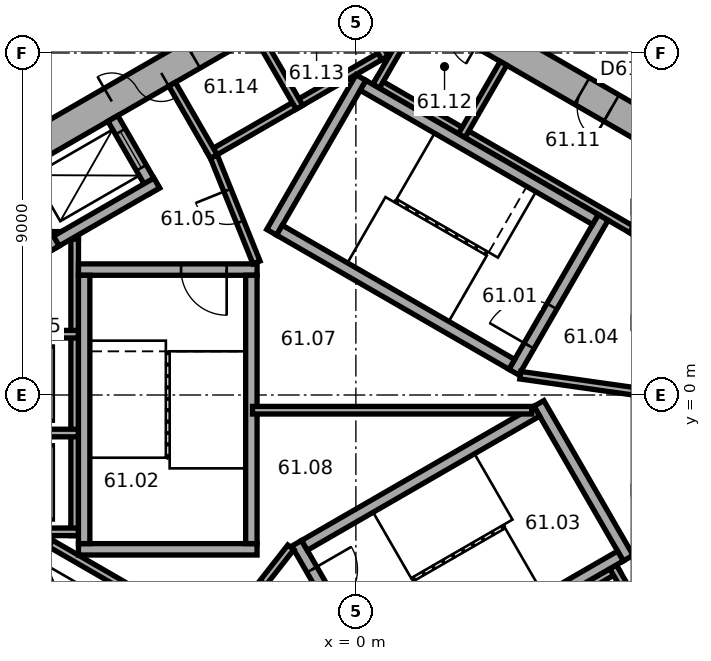
"""IFC4 building model, lengths in metres.
Left out: names, types, materials, properties, quantities, classifications, styles, units other than length and angle.
Written with IfcOpenShell. Run it as: python <this file> out.ifc"""

import sys

from ifc_helpers import new_model, si_unit, direction, frame, frame_2d, origin, place, context, subcontext, project, spatial, rectangle, extrude, element, fill, save


model = new_model("IFC4")
c1 = context("Model", 3, precision=1e-05, world=origin(), true_north=direction((0.0, 1.0)))
c2 = subcontext(c1, "Body", "Model", "MODEL_VIEW")
j1 = project(units=[si_unit("LENGTHUNIT", "METRE"), si_unit("PLANEANGLEUNIT", "RADIAN")], contexts=[c1])
p1 = place(None, origin())
s1 = spatial("IfcSite", under=j1, at=p1, CompositionType="ELEMENT")
p2 = place(p1, origin())
s2 = spatial("IfcBuilding", under=s1, at=p2, CompositionType="ELEMENT")
p3 = place(p2, frame((0.0, 0.0, 247.6)))
s3 = spatial("IfcBuildingStorey", under=s2, at=p3, CompositionType="ELEMENT", Elevation=247.6)
p4 = place(p3, frame((10.1, 5.6, 0.0), z_axis=(0.0, 0.0, 1.0), x_axis=(-0.866023897231, 0.500002609418, 0.0)))
e1 = element("IfcWall", 1, at=p4, inside=s3, PredefinedType="SHEAR", context=c2, shape_type="SweptSolid", body=[
    extrude(rectangle(XDim=11.894, YDim=0.8, at=frame_2d((5.947, 0.0))), origin(), (0.0, 0.0, 1.0), 3.7),
])
p5 = place(p4, frame((3.897, 0.0, 0.0)))
e2 = element("IfcOpeningElement", 2, at=p5, cuts=e1, PredefinedType="OPENING", context=c2, shape_type="SweptSolid", body=[
    extrude(rectangle(XDim=0.9, YDim=2.1, at=frame_2d((0.45, 1.05))), frame((0.0, 0.41, 0.0), z_axis=(0.0, -1.0, 0.0), x_axis=(1.0, 0.0, 0.0)), (0.0, 0.0, 1.0), 0.82),
])
p6 = place(p4, frame((7.797, 0.0, 0.0)))
e3 = element("IfcOpeningElement", 3, at=p6, cuts=e1, PredefinedType="OPENING", context=c2, shape_type="SweptSolid", body=[
    extrude(rectangle(XDim=0.9, YDim=2.1, at=frame_2d((0.45, 1.05))), frame((0.0, 0.41, 0.0), z_axis=(0.0, -1.0, 0.0), x_axis=(1.0, 0.0, 0.0)), (0.0, 0.0, 1.0), 0.82),
])
p7 = place(p3, frame((0.2, 11.547, 0.0), z_axis=(0.0, 0.0, 1.0), x_axis=(-0.866023897231, -0.500002609418, 0.0)))
e4 = element("IfcWall", 4, at=p7, inside=s3, PredefinedType="SHEAR", context=c2, shape_type="SweptSolid", body=[
    extrude(rectangle(XDim=11.894, YDim=0.8, at=frame_2d((5.947, 0.0))), origin(), (0.0, 0.0, 1.0), 3.7),
])
p8 = place(p7, frame((6.147, 0.0, 0.0)))
e5 = element("IfcOpeningElement", 5, at=p8, cuts=e4, PredefinedType="OPENING", context=c2, shape_type="SweptSolid", body=[
    extrude(rectangle(XDim=1.5, YDim=2.1, at=frame_2d((0.75, 1.05))), frame((0.0, 0.41, 0.0), z_axis=(0.0, -1.0, 0.0), x_axis=(1.0, 0.0, 0.0)), (0.0, 0.0, 1.0), 0.82),
])
p9 = place(p7, frame((1.697, 0.0, 0.0)))
e6 = element("IfcOpeningElement", 6, at=p9, cuts=e4, PredefinedType="OPENING", context=c2, shape_type="SweptSolid", body=[
    extrude(rectangle(XDim=0.9, YDim=2.1, at=frame_2d((0.45, 1.05))), frame((0.0, 0.41, 0.0), z_axis=(0.0, -1.0, 0.0), x_axis=(1.0, 0.0, 0.0)), (0.0, 0.0, 1.0), 0.82),
])
p10 = place(p7, frame((4.297, 0.0, 0.0)))
e7 = element("IfcOpeningElement", 7, at=p10, cuts=e4, PredefinedType="OPENING", context=c2, shape_type="SweptSolid", body=[
    extrude(rectangle(XDim=0.9, YDim=2.1, at=frame_2d((0.45, 1.05))), frame((0.0, 0.41, 0.0), z_axis=(0.0, -1.0, 0.0), x_axis=(1.0, 0.0, 0.0)), (0.0, 0.0, 1.0), 0.82),
])
p11 = place(p3, frame((7.424, 4.259, 0.0), z_axis=(0.0, 0.0, 1.0), x_axis=(-0.866026010844, 0.49999894854, 0.0)))
e8 = element("IfcWall", 8, at=p11, inside=s3, PredefinedType="PARTITIONING", context=c2, shape_type="SweptSolid", body=[
    extrude(rectangle(XDim=8.0, YDim=0.2, at=frame_2d((4.0, 0.0))), origin(), (0.0, 0.0, 1.0), 3.42),
])
for number, where, z_axis, x_axis in (
    (9, (7.287, 4.222, 0.0), (0.0, 0.0, 1.0), (0.5, 0.866, 0.0)),
    (10, (2.784, 6.822, 0.0), (0.0, 0.0, 1.0), (0.5, 0.866, 0.0)),
    (11, (0.532, 8.122, 0.0), (0.0, 0.0, 1.0), (0.5, 0.866, 0.0)),
):
    element("IfcWall", number, at=place(p3, frame(where, z_axis=z_axis, x_axis=x_axis)), inside=s3, PredefinedType="PARTITIONING", context=c2, shape_type="SweptSolid", body=[
        extrude(rectangle(XDim=2.2, YDim=0.2, at=frame_2d((1.1, 0.0))), origin(), (0.0, 0.0, 1.0), 3.42),
    ])
p12 = place(p3, frame((0.803, 9.009, 0.0), z_axis=(0.0, 0.0, 1.0), x_axis=(-0.866028230842, -0.499995103361, 0.0)))
e12 = element("IfcWall", 12, at=p12, inside=s3, PredefinedType="PARTITIONING", context=c2, shape_type="SweptSolid", body=[
    extrude(rectangle(XDim=5.4, YDim=0.2, at=frame_2d((2.7, 0.0))), origin(), (0.0, 0.0, 1.0), 3.42),
])
p13 = place(p3, frame((0.767, 8.872, 0.0), z_axis=(0.0, 0.0, 1.0), x_axis=(-0.499994660107, 0.866028486751, 0.0)))
e13 = element("IfcWall", 13, at=p13, inside=s3, PredefinedType="PARTITIONING", context=c2, shape_type="SweptSolid", body=[
    extrude(rectangle(XDim=2.2, YDim=0.2, at=frame_2d((1.1, 0.0))), origin(), (0.0, 0.0, 1.0), 3.42),
])
for number, where, z_axis, x_axis in (
    (14, (-1.485, 7.572, 0.0), (0.0, 0.0, 1.0), (-0.5, 0.866, 0.0)),
    (15, (-3.737, 6.272, 0.0), (0.0, 0.0, 1.0), (-0.5, 0.866, 0.0)),
):
    element("IfcWall", number, at=place(p3, frame(where, z_axis=z_axis, x_axis=x_axis)), inside=s3, PredefinedType="PARTITIONING", context=c2, shape_type="SweptSolid", body=[
        extrude(rectangle(XDim=2.2, YDim=0.2, at=frame_2d((1.1, 0.0))), origin(), (0.0, 0.0, 1.0), 3.42),
    ])
p14 = place(p3, frame((-7.4, 4.3, 0.0), z_axis=(0.0, 0.0, 1.0), x_axis=(0.0, -1.0, 0.0)))
e16 = element("IfcWall", 16, at=p14, inside=s3, PredefinedType="PARTITIONING", context=c2, shape_type="SweptSolid", body=[
    extrude(rectangle(XDim=8.0, YDim=0.2, at=frame_2d((4.0, 0.0))), origin(), (0.0, 0.0, 1.0), 3.42),
])
for number, where, z_axis, x_axis in (
    (17, (-7.3, 4.2, 0.0), (0.0, 0.0, 1.0), (-1.0, 0.0, 0.0)),
    (18, (-7.3, 1.6, 0.0), (0.0, 0.0, 1.0), (-1.0, 0.0, 0.0)),
    (19, (-7.3, -1.0, 0.0), (0.0, 0.0, 1.0), (-1.0, 0.0, 0.0)),
    (20, (-7.3, -3.6, 0.0), (0.0, 0.0, 1.0), (-1.0, 0.0, 0.0)),
):
    element("IfcWall", number, at=place(p3, frame(where, z_axis=z_axis, x_axis=x_axis)), inside=s3, PredefinedType="PARTITIONING", context=c2, shape_type="SweptSolid", body=[
        extrude(rectangle(XDim=2.2, YDim=0.2, at=frame_2d((1.1, 0.0))), origin(), (0.0, 0.0, 1.0), 3.42),
    ])
p15 = place(p3, frame((-8.203, -3.809, 0.0), z_axis=(0.0, 0.0, 1.0), x_axis=(0.866028230842, -0.499995103361, 0.0)))
e21 = element("IfcWall", 21, at=p15, inside=s3, PredefinedType="PARTITIONING", context=c2, shape_type="SweptSolid", body=[
    extrude(rectangle(XDim=5.4, YDim=0.2, at=frame_2d((2.7, 0.0))), origin(), (0.0, 0.0, 1.0), 3.42),
])
p16 = place(p3, frame((-8.067, -3.772, 0.0), z_axis=(0.0, 0.0, 1.0), x_axis=(-0.50002983664, -0.866008176907, 0.0)))
e22 = element("IfcWall", 22, at=p16, inside=s3, PredefinedType="PARTITIONING", context=c2, shape_type="SweptSolid", body=[
    extrude(rectangle(XDim=2.2, YDim=0.2, at=frame_2d((1.1, 0.0))), origin(), (0.0, 0.0, 1.0), 3.42),
])
p17 = place(p3, frame((-0.024, -8.559, 0.0), z_axis=(0.0, 0.0, 1.0), x_axis=(0.866026010844, 0.49999894854, 0.0)))
e23 = element("IfcWall", 23, at=p17, inside=s3, PredefinedType="PARTITIONING", context=c2, shape_type="SweptSolid", body=[
    extrude(rectangle(XDim=8.0, YDim=0.2, at=frame_2d((4.0, 0.0))), origin(), (0.0, 0.0, 1.0), 3.42),
])
p18 = place(p3, frame((6.768, -4.522, 0.0), z_axis=(0.0, 0.0, 1.0), x_axis=(0.50002983664, -0.866008176907, 0.0)))
e24 = element("IfcWall", 24, at=p18, inside=s3, PredefinedType="PARTITIONING", context=c2, shape_type="SweptSolid", body=[
    extrude(rectangle(XDim=2.2, YDim=0.2, at=frame_2d((1.1, 0.0))), origin(), (0.0, 0.0, 1.0), 3.42),
])
p19 = place(p3, frame((4.158, 0.602, 0.0), z_axis=(0.0, 0.0, 1.0), x_axis=(0.499977259774, 0.866038532462, 0.0)))
e25 = element("IfcWall", 25, at=p19, inside=s3, PredefinedType="SHEAR", context=c2, shape_type="SweptSolid", body=[
    extrude(rectangle(XDim=4.7, YDim=0.3, at=frame_2d((2.35, 0.0))), origin(), (0.0, 0.0, 1.0), 3.42),
])
p20 = place(p19, frame((0.8, 0.0, 0.0)))
e26 = element("IfcOpeningElement", 26, at=p20, cuts=e25, PredefinedType="OPENING", context=c2, shape_type="SweptSolid", body=[
    extrude(rectangle(XDim=1.2, YDim=2.1, at=frame_2d((0.6, 1.05))), frame((0.0, 0.16, 0.0), z_axis=(0.0, -1.0, 0.0), x_axis=(1.0, 0.0, 0.0)), (0.0, 0.0, 1.0), 0.32),
])
p21 = place(p3, frame((-2.216, 4.282, 0.0), z_axis=(0.0, 0.0, 1.0), x_axis=(0.499977259774, 0.866038532462, 0.0)))
e27 = element("IfcWall", 27, at=p21, inside=s3, PredefinedType="SHEAR", context=c2, shape_type="SweptSolid", body=[
    extrude(rectangle(XDim=4.7, YDim=0.3, at=frame_2d((2.35, 0.0))), origin(), (0.0, 0.0, 1.0), 3.42),
])
for number, where, z_axis, x_axis in (
    (28, (4.103, 0.807, 0.0), (0.0, 0.0, 1.0), (-0.866, 0.5, 0.0)),
    (29, (6.303, 4.617, 0.0), (0.0, 0.0, 1.0), (-0.866, 0.5, 0.0)),
):
    element("IfcWall", number, at=place(p3, frame(where, z_axis=z_axis, x_axis=x_axis)), inside=s3, PredefinedType="SHEAR", context=c2, shape_type="SweptSolid", body=[
        extrude(rectangle(XDim=7.06, YDim=0.3, at=frame_2d((3.53, 0.0))), origin(), (0.0, 0.0, 1.0), 3.42),
    ])
p22 = place(p3, frame((-2.6, 3.3, 0.0), z_axis=(0.0, 0.0, 1.0), x_axis=(-1.0, 0.0, 0.0)))
e30 = element("IfcWall", 30, at=p22, inside=s3, PredefinedType="SHEAR", context=c2, shape_type="SweptSolid", body=[
    extrude(rectangle(XDim=4.7, YDim=0.3, at=frame_2d((2.35, 0.0))), origin(), (0.0, 0.0, 1.0), 3.42),
])
p23 = place(p22, frame((0.8, 0.0, 0.0)))
e31 = element("IfcOpeningElement", 31, at=p23, cuts=e30, PredefinedType="OPENING", context=c2, shape_type="SweptSolid", body=[
    extrude(rectangle(XDim=1.2, YDim=2.1, at=frame_2d((0.6, 1.05))), frame((0.0, 0.16, 0.0), z_axis=(0.0, -1.0, 0.0), x_axis=(1.0, 0.0, 0.0)), (0.0, 0.0, 1.0), 0.32),
])
p24 = place(p3, frame((-2.6, -4.06, 0.0), z_axis=(0.0, 0.0, 1.0), x_axis=(-1.0, 0.0, 0.0)))
e32 = element("IfcWall", 32, at=p24, inside=s3, PredefinedType="SHEAR", context=c2, shape_type="SweptSolid", body=[
    extrude(rectangle(XDim=4.7, YDim=0.3, at=frame_2d((2.35, 0.0))), origin(), (0.0, 0.0, 1.0), 3.42),
])
for number, where, z_axis, x_axis in (
    (33, (-2.75, 3.15, 0.0), (0.0, 0.0, 1.0), (0.0, -1.0, 0.0)),
    (34, (-7.15, 3.15, 0.0), (0.0, 0.0, 1.0), (0.0, -1.0, 0.0)),
):
    element("IfcWall", number, at=place(p3, frame(where, z_axis=z_axis, x_axis=x_axis)), inside=s3, PredefinedType="SHEAR", context=c2, shape_type="SweptSolid", body=[
        extrude(rectangle(XDim=7.06, YDim=0.3, at=frame_2d((3.53, 0.0))), origin(), (0.0, 0.0, 1.0), 3.42),
    ])
p25 = place(p3, frame((-1.558, -3.902, 0.0), z_axis=(0.0, 0.0, 1.0), x_axis=(0.499977259774, -0.866038532462, 0.0)))
e35 = element("IfcWall", 35, at=p25, inside=s3, PredefinedType="SHEAR", context=c2, shape_type="SweptSolid", body=[
    extrude(rectangle(XDim=4.7, YDim=0.3, at=frame_2d((2.35, 0.0))), origin(), (0.0, 0.0, 1.0), 3.42),
])
p26 = place(p25, frame((0.8, 0.0, 0.0)))
e36 = element("IfcOpeningElement", 36, at=p26, cuts=e35, PredefinedType="OPENING", context=c2, shape_type="SweptSolid", body=[
    extrude(rectangle(XDim=1.2, YDim=2.1, at=frame_2d((0.6, 1.05))), frame((0.0, 0.16, 0.0), z_axis=(0.0, -1.0, 0.0), x_axis=(1.0, 0.0, 0.0)), (0.0, 0.0, 1.0), 0.32),
])
p27 = place(p3, frame((4.816, -0.222, 0.0), z_axis=(0.0, 0.0, 1.0), x_axis=(0.499977259774, -0.866038532462, 0.0)))
e37 = element("IfcWall", 37, at=p27, inside=s3, PredefinedType="SHEAR", context=c2, shape_type="SweptSolid", body=[
    extrude(rectangle(XDim=4.7, YDim=0.3, at=frame_2d((2.35, 0.0))), origin(), (0.0, 0.0, 1.0), 3.42),
])
for number, where, z_axis, x_axis in (
    (38, (-1.353, -3.957, 0.0), (0.0, 0.0, 1.0), (0.866, 0.5, 0.0)),
    (39, (0.847, -7.767, 0.0), (0.0, 0.0, 1.0), (0.866, 0.5, 0.0)),
):
    element("IfcWall", number, at=place(p3, frame(where, z_axis=z_axis, x_axis=x_axis)), inside=s3, PredefinedType="SHEAR", context=c2, shape_type="SweptSolid", body=[
        extrude(rectangle(XDim=7.06, YDim=0.3, at=frame_2d((3.53, 0.0))), origin(), (0.0, 0.0, 1.0), 3.42),
    ])
p28 = place(p3, frame((4.327, 0.521, 0.0), z_axis=(0.0, 0.0, 1.0), x_axis=(0.990124376366, -0.14019172346, 0.0)))
e40 = element("IfcWall", 40, at=p28, inside=s3, PredefinedType="PARTITIONING", context=c2, shape_type="SweptSolid", body=[
    extrude(rectangle(XDim=3.002, YDim=0.2, at=frame_2d((1.501, 0.0))), origin(), (0.0, 0.0, 1.0), 3.42),
])
p29 = place(p3, frame((-5.295, 5.372, 0.0), z_axis=(0.0, 0.0, 1.0), x_axis=(-0.500077893725, 0.86598042715, 0.0)))
e41 = element("IfcWall", 41, at=p29, inside=s3, PredefinedType="SHEAR", context=c2, shape_type="SweptSolid", body=[
    extrude(rectangle(XDim=2.2, YDim=0.3, at=frame_2d((1.1, 0.0))), origin(), (0.0, 0.0, 1.0), 3.42),
])
p30 = place(p29, frame((0.7, 0.0, 0.0)))
e42 = element("IfcOpeningElement", 42, at=p30, cuts=e41, PredefinedType="OPENING", context=c2, shape_type="SweptSolid", body=[
    extrude(rectangle(XDim=1.1, YDim=2.1, at=frame_2d((0.55, 1.05))), frame((0.0, 0.16, 0.0), z_axis=(0.0, -1.0, 0.0), x_axis=(1.0, 0.0, 0.0)), (0.0, 0.0, 1.0), 0.32),
])
p31 = place(p3, frame((-5.24, 5.577, 0.0), z_axis=(0.0, 0.0, 1.0), x_axis=(-0.866014461049, -0.500018952895, 0.0)))
e43 = element("IfcWall", 43, at=p31, inside=s3, PredefinedType="SHEAR", context=c2, shape_type="SweptSolid", body=[
    extrude(rectangle(XDim=3.35, YDim=0.3, at=frame_2d((1.675, 0.0))), origin(), (0.0, 0.0, 1.0), 3.42),
])
p32 = place(p3, frame((-7.937, 3.847, 0.0), z_axis=(0.0, 0.0, 1.0), x_axis=(-0.50002983664, 0.866008176907, 0.0)))
e44 = element("IfcWall", 44, at=p32, inside=s3, PredefinedType="SHEAR", context=c2, shape_type="SweptSolid", body=[
    extrude(rectangle(XDim=2.2, YDim=0.3, at=frame_2d((1.1, 0.0))), origin(), (0.0, 0.0, 1.0), 3.42),
])
p33 = place(p3, frame((-2.615, 3.487, 0.0), z_axis=(0.0, 0.0, 1.0), x_axis=(-0.373576831041, 0.92759924068, 0.0)))
e45 = element("IfcWall", 45, at=p33, inside=s3, PredefinedType="PARTITIONING", context=c2, shape_type="SweptSolid", body=[
    extrude(rectangle(XDim=3.002, YDim=0.2, at=frame_2d((1.501, 0.0))), origin(), (0.0, 0.0, 1.0), 3.42),
])
p34 = place(p33, frame((1.15, 0.0, 0.0)))
e46 = element("IfcOpeningElement", 46, at=p34, cuts=e45, PredefinedType="OPENING", context=c2, shape_type="SweptSolid", body=[
    extrude(rectangle(XDim=0.9, YDim=2.1, at=frame_2d((0.45, 1.05))), frame((0.0, 0.11, 0.0), z_axis=(0.0, -1.0, 0.0), x_axis=(1.0, 0.0, 0.0)), (0.0, 0.0, 1.0), 0.22),
])
p35 = place(p3, frame((-1.712, -4.008, 0.0), z_axis=(0.0, 0.0, 1.0), x_axis=(-0.616549420702, -0.787316208287, 0.0)))
e47 = element("IfcWall", 47, at=p35, inside=s3, PredefinedType="PARTITIONING", context=c2, shape_type="SweptSolid", body=[
    extrude(rectangle(XDim=3.002, YDim=0.2, at=frame_2d((1.501, 0.0))), origin(), (0.0, 0.0, 1.0), 3.42),
])
p36 = place(p35, frame((1.15, 0.0, 0.0)))
e48 = element("IfcOpeningElement", 48, at=p36, cuts=e47, PredefinedType="OPENING", context=c2, shape_type="SweptSolid", body=[
    extrude(rectangle(XDim=0.9, YDim=2.1, at=frame_2d((0.45, 1.05))), frame((0.0, 0.11, 0.0), z_axis=(0.0, -1.0, 0.0), x_axis=(1.0, 0.0, 0.0)), (0.0, 0.0, 1.0), 0.22),
])
p37 = place(p3, frame((-2.72, -0.4, 0.0), z_axis=(0.0, 0.0, 1.0), x_axis=(1.0, 0.0, 0.0)))
e49 = element("IfcWall", 49, at=p37, inside=s3, PredefinedType="PARTITIONING", context=c2, shape_type="SweptSolid", body=[
    extrude(rectangle(XDim=7.347, YDim=0.2, at=frame_2d((3.674, 0.0))), origin(), (0.0, 0.0, 1.0), 3.42),
])
p38 = place(p3, frame((11.25, 7.592, 0.0), z_axis=(0.0, 0.0, 1.0), x_axis=(-0.866024037175, 0.500002367029, 0.0)))
e50 = element("IfcWall", 50, at=p38, inside=s3, PredefinedType="PARTITIONING", context=c2, shape_type="SweptSolid", body=[
    extrude(rectangle(XDim=11.854, YDim=0.2, at=frame_2d((5.927, 0.0))), origin(), (0.0, 0.0, 1.0), 3.42),
])
p39 = place(p38, frame((3.59, 0.0, 0.0)))
e51 = element("IfcOpeningElement", 51, at=p39, cuts=e50, PredefinedType="OPENING", context=c2, shape_type="SweptSolid", body=[
    extrude(rectangle(XDim=1.0, YDim=2.1, at=frame_2d((0.5, 1.05))), frame((0.0, 0.11, 0.0), z_axis=(0.0, -1.0, 0.0), x_axis=(1.0, 0.0, 0.0)), (0.0, 0.0, 1.0), 0.22),
])
p40 = place(p8, origin())
e52 = element("IfcDoor", 52, at=p40, inside=s3, OperationType="DOUBLE_DOOR_SINGLE_SWING", PredefinedType="DOOR", context=c2, shape_type="SweptSolid", body=[
    extrude(rectangle(XDim=1.5, YDim=2.1, at=frame_2d((0.75, 1.05))), frame((0.0, 0.025, 0.0), z_axis=(0.0, -1.0, 0.0), x_axis=(1.0, 0.0, 0.0)), (0.0, 0.0, 1.0), 0.05),
])
fill(e5, e52)
p41 = place(p20, origin())
e53 = element("IfcDoor", 53, at=p41, inside=s3, OperationType="SINGLE_SWING_RIGHT", PredefinedType="DOOR", context=c2, shape_type="SweptSolid", body=[
    extrude(rectangle(XDim=1.2, YDim=2.1, at=frame_2d((0.6, 1.05))), frame((0.0, 0.025, 0.0), z_axis=(0.0, -1.0, 0.0), x_axis=(1.0, 0.0, 0.0)), (0.0, 0.0, 1.0), 0.05),
])
fill(e26, e53)
p42 = place(p23, origin())
e54 = element("IfcDoor", 54, at=p42, inside=s3, OperationType="SINGLE_SWING_RIGHT", PredefinedType="DOOR", context=c2, shape_type="SweptSolid", body=[
    extrude(rectangle(XDim=1.2, YDim=2.1, at=frame_2d((0.6, 1.05))), frame((0.0, 0.025, 0.0), z_axis=(0.0, -1.0, 0.0), x_axis=(1.0, 0.0, 0.0)), (0.0, 0.0, 1.0), 0.05),
])
fill(e31, e54)
p43 = place(p26, origin())
e55 = element("IfcDoor", 55, at=p43, inside=s3, OperationType="SINGLE_SWING_RIGHT", PredefinedType="DOOR", context=c2, shape_type="SweptSolid", body=[
    extrude(rectangle(XDim=1.2, YDim=2.1, at=frame_2d((0.6, 1.05))), frame((0.0, 0.025, 0.0), z_axis=(0.0, -1.0, 0.0), x_axis=(1.0, 0.0, 0.0)), (0.0, 0.0, 1.0), 0.05),
])
fill(e36, e55)
p44 = place(p34, origin())
e56 = element("IfcDoor", 56, at=p44, inside=s3, OperationType="SINGLE_SWING_LEFT", PredefinedType="DOOR", context=c2, shape_type="SweptSolid", body=[
    extrude(rectangle(XDim=0.9, YDim=2.1, at=frame_2d((0.45, 1.05))), frame((0.0, 0.025, 0.0), z_axis=(0.0, -1.0, 0.0), x_axis=(1.0, 0.0, 0.0)), (0.0, 0.0, 1.0), 0.05),
])
fill(e46, e56)
p45 = place(p36, origin())
e57 = element("IfcDoor", 57, at=p45, inside=s3, OperationType="SINGLE_SWING_LEFT", PredefinedType="DOOR", context=c2, shape_type="SweptSolid", body=[
    extrude(rectangle(XDim=0.9, YDim=2.1, at=frame_2d((0.45, 1.05))), frame((0.0, 0.025, 0.0), z_axis=(0.0, -1.0, 0.0), x_axis=(1.0, 0.0, 0.0)), (0.0, 0.0, 1.0), 0.05),
])
fill(e48, e57)
p46 = place(p5, origin())
e58 = element("IfcDoor", 58, at=p46, inside=s3, OperationType="SINGLE_SWING_LEFT", PredefinedType="DOOR", context=c2, shape_type="SweptSolid", body=[
    extrude(rectangle(XDim=0.9, YDim=2.1, at=frame_2d((0.45, 1.05))), frame((0.0, 0.025, 0.0), z_axis=(0.0, -1.0, 0.0), x_axis=(1.0, 0.0, 0.0)), (0.0, 0.0, 1.0), 0.05),
])
fill(e2, e58)
p47 = place(p10, origin())
e59 = element("IfcDoor", 59, at=p47, inside=s3, OperationType="SINGLE_SWING_LEFT", PredefinedType="DOOR", context=c2, shape_type="SweptSolid", body=[
    extrude(rectangle(XDim=0.9, YDim=2.1, at=frame_2d((0.45, 1.05))), frame((0.0, 0.025, 0.0), z_axis=(0.0, -1.0, 0.0), x_axis=(1.0, 0.0, 0.0)), (0.0, 0.0, 1.0), 0.05),
])
fill(e7, e59)
p48 = place(p30, origin())
e60 = element("IfcDoor", 60, at=p48, inside=s3, OperationType="DOUBLE_DOOR_SLIDING", PredefinedType="DOOR", context=c2, shape_type="SweptSolid", body=[
    extrude(rectangle(XDim=1.1, YDim=2.1, at=frame_2d((0.55, 1.05))), frame((0.0, 0.025, 0.0), z_axis=(0.0, -1.0, 0.0), x_axis=(1.0, 0.0, 0.0)), (0.0, 0.0, 1.0), 0.05),
])
fill(e42, e60)
save(model, sys.argv[1])
